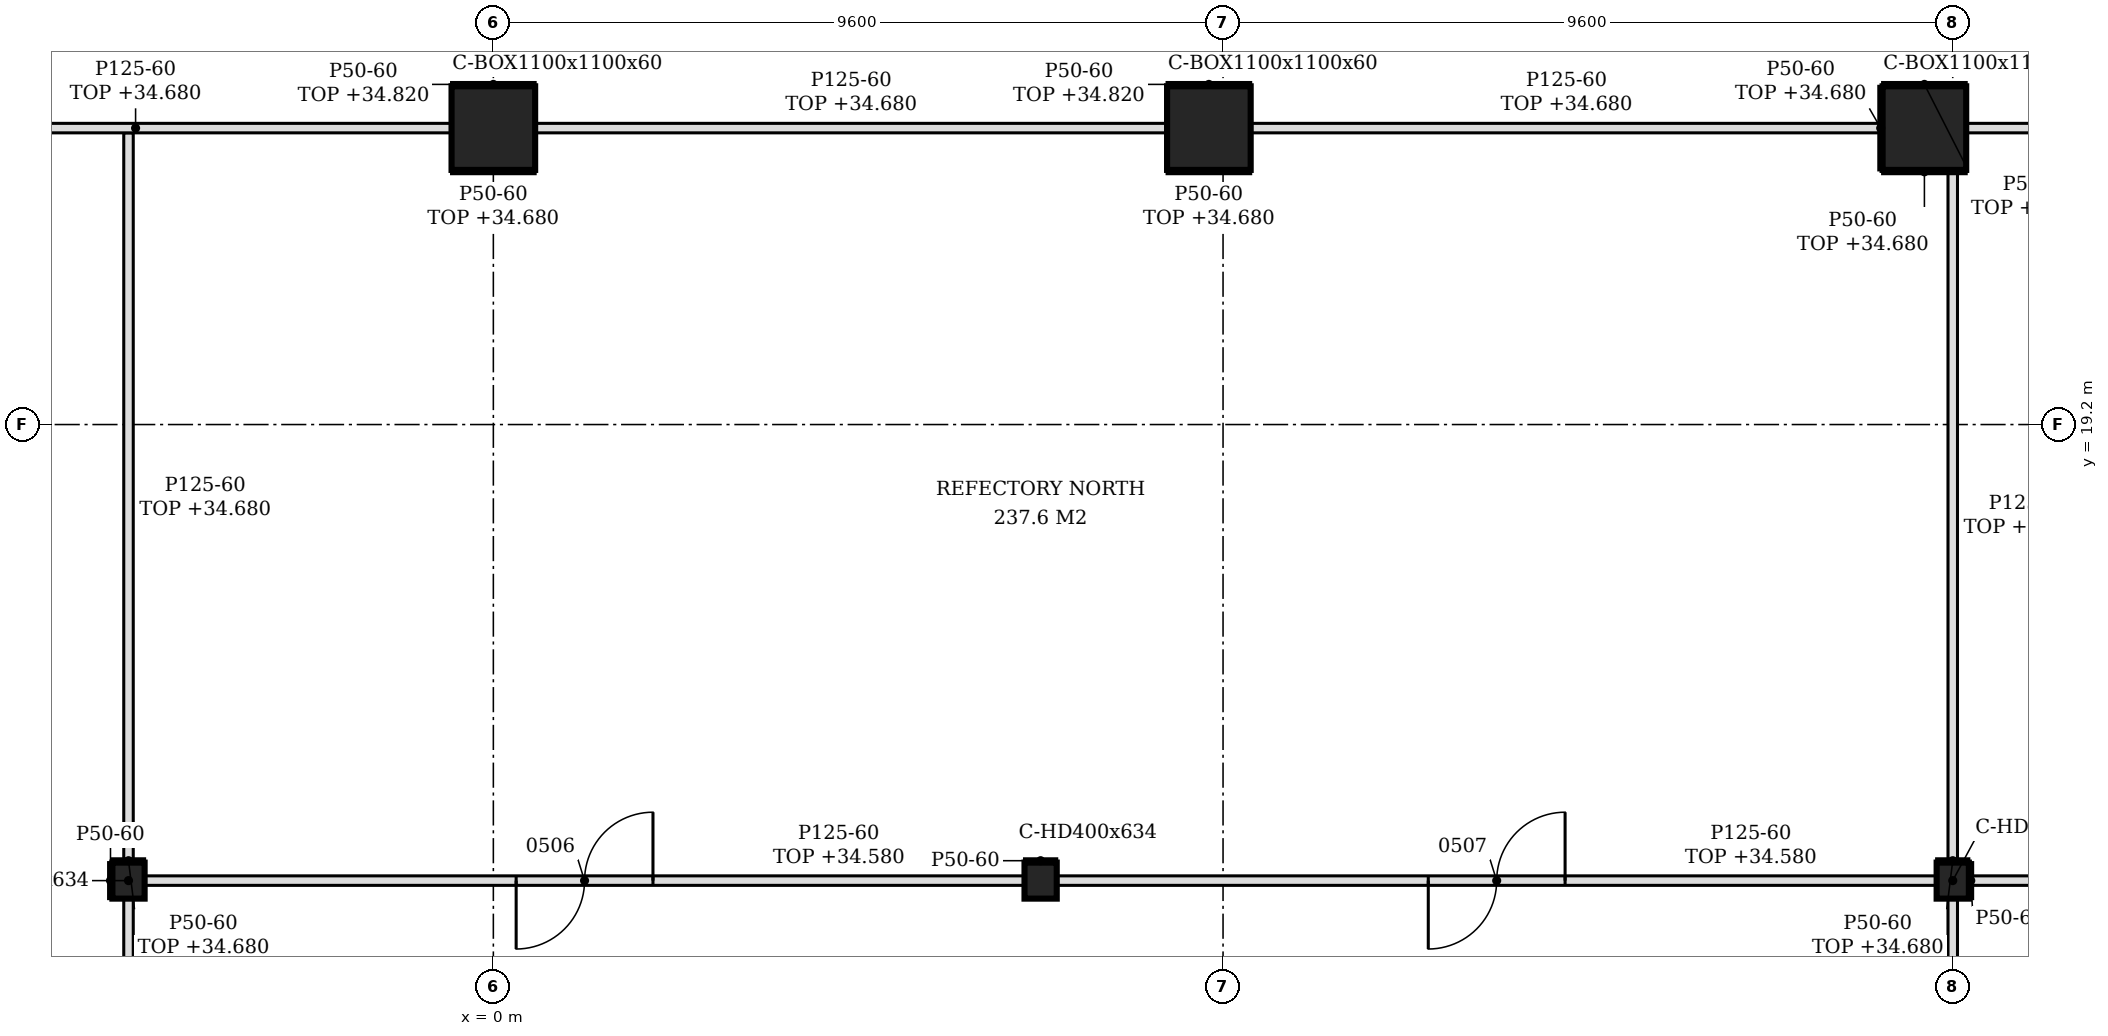
"""IFC4 building model, lengths in metres.
Left out: names, types, materials, properties, quantities, classifications, styles, units other than length and angle.
Written with IfcOpenShell. Run it as: python <this file> out.ifc"""

import sys

from ifc_helpers import new_model, si_unit, direction, frame, frame_2d, origin, origin_2d, place, context, subcontext, project, spatial, polyline, rectangle, hollow_rectangle, i_section, outline, extrude, element, fill, save


model = new_model("IFC4")
c1 = context("Model", 3, precision=1e-05, world=origin(), true_north=direction((0.0, 1.0)))
c2 = subcontext(c1, "Body", "Model", "MODEL_VIEW")
j1 = project(units=[si_unit("LENGTHUNIT", "METRE"), si_unit("PLANEANGLEUNIT", "RADIAN")], contexts=[c1])
p1 = place(None, origin())
s1 = spatial("IfcSite", under=j1, at=p1, CompositionType="ELEMENT")
p2 = place(p1, origin())
s2 = spatial("IfcBuilding", under=s1, at=p2, CompositionType="ELEMENT")
p3 = place(p2, frame((0.0, 0.0, 30.6)))
s3 = spatial("IfcBuildingStorey", under=s2, at=p3, CompositionType="ELEMENT", Elevation=30.6)
for number, where, z_axis, x_axis in (
    (1, (18.827, 23.1, -0.2), (0.0, 0.0, 1.0), (1.0, 0.0, 0.0)),
    (2, (9.414, 23.1, -0.2), (0.0, 0.0, 1.0), (1.0, 0.0, 0.0)),
    (3, (0.0, 23.1, -0.2), (0.0, 0.0, 1.0), (1.0, 0.0, 0.0)),
):
    element("IfcColumn", number, at=place(p3, frame(where, z_axis=z_axis, x_axis=x_axis)), inside=s3, PredefinedType="COLUMN", context=c2, shape_type="SweptSolid", body=[
        extrude(hollow_rectangle(XDim=1.1, YDim=1.1, WallThickness=0.06, at=origin_2d()), origin(), (0.0, 0.0, 1.0), 4.8),
    ])
for number, where, z_axis, x_axis in (
    (4, (-4.8, 13.2, -0.2), (0.0, 0.0, 1.0), (1.0, 0.0, 0.0)),
    (5, (7.2, 13.2, -0.2), (0.0, 0.0, 1.0), (1.0, 0.0, 0.0)),
    (6, (19.2, 13.2, -0.2), (0.0, 0.0, 1.0), (1.0, 0.0, 0.0)),
):
    element("IfcColumn", number, at=place(p3, frame(where, z_axis=z_axis, x_axis=x_axis)), inside=s3, PredefinedType="COLUMN", context=c2, shape_type="SweptSolid", body=[
        extrude(i_section(OverallWidth=0.424, OverallDepth=0.474, WebThickness=0.048, FlangeThickness=0.077, FilletRadius=0.015, at=origin_2d()), origin(), (0.0, 0.0, 1.0), 4.8),
    ])
for number, where, z_axis, x_axis in (
    (7, (-4.8, 7.863, 0.0), (0.0, 0.0, 1.0), (0.0, 1.0, 0.0)),
    (8, (19.2, 7.863, 0.0), (0.0, 0.0, 1.0), (0.0, 1.0, 0.0)),
):
    element("IfcWall", number, at=place(p3, frame(where, z_axis=z_axis, x_axis=x_axis)), inside=s3, PredefinedType="PARTITIONING", context=c2, shape_type="SweptSolid", body=[
        extrude(rectangle(XDim=5.1, YDim=0.125, at=frame_2d((2.55, 0.0))), origin(), (0.0, 0.0, 1.0), 3.98),
    ])
p4 = place(p3, frame((-4.588, 13.2, 0.0), z_axis=(0.0, 0.0, 1.0), x_axis=(1.0, 0.0, 0.0)))
e9 = element("IfcWall", 9, at=p4, inside=s3, PredefinedType="PARTITIONING", context=c2, shape_type="SweptSolid", body=[
    extrude(rectangle(XDim=11.576, YDim=0.125, at=frame_2d((5.788, 0.0))), origin(), (0.0, 0.0, 1.0), 3.98),
])
p5 = place(p4, frame((4.888, 0.0, 0.0)))
e10 = element("IfcOpeningElement", 10, at=p5, cuts=e9, PredefinedType="OPENING", context=c2, shape_type="SweptSolid", body=[
    extrude(rectangle(XDim=1.8, YDim=2.1, at=frame_2d((0.9, 1.05))), frame((0.0, 0.073, 0.0), z_axis=(0.0, -1.0, 0.0), x_axis=(1.0, 0.0, 0.0)), (0.0, 0.0, 1.0), 0.145),
])
p6 = place(p3, frame((7.412, 13.2, 0.0), z_axis=(0.0, 0.0, 1.0), x_axis=(1.0, 0.0, 0.0)))
e11 = element("IfcWall", 11, at=p6, inside=s3, PredefinedType="PARTITIONING", context=c2, shape_type="SweptSolid", body=[
    extrude(rectangle(XDim=11.576, YDim=0.125, at=frame_2d((5.788, 0.0))), origin(), (0.0, 0.0, 1.0), 3.98),
])
p7 = place(p6, frame((4.888, 0.0, 0.0)))
e12 = element("IfcOpeningElement", 12, at=p7, cuts=e11, PredefinedType="OPENING", context=c2, shape_type="SweptSolid", body=[
    extrude(rectangle(XDim=1.8, YDim=2.1, at=frame_2d((0.9, 1.05))), frame((0.0, 0.073, 0.0), z_axis=(0.0, -1.0, 0.0), x_axis=(1.0, 0.0, 0.0)), (0.0, 0.0, 1.0), 0.145),
])
p8 = place(p3, frame((19.412, 13.2, 0.0), z_axis=(0.0, 0.0, 1.0), x_axis=(1.0, 0.0, 0.0)))
e13 = element("IfcWall", 13, at=p8, inside=s3, PredefinedType="PARTITIONING", context=c2, shape_type="SweptSolid", body=[
    extrude(outline(polyline([(0.0, 0.0), (8.425, 0.0), (8.426, 4.08), (8.338, 4.08), (8.336, 4.6), (4.678, 4.6), (4.676, 4.18), (4.498, 4.18), (4.496, 4.6), (0.0, 4.6), (0.0, 0.0)])), frame((0.0, 0.062, 0.0), z_axis=(0.0, -1.0, 0.0), x_axis=(1.0, 0.0, 0.0)), (0.0, 0.0, 1.0), 0.125),
])
p9 = place(p3, frame((-4.8, 13.437, 0.0), z_axis=(0.0, 0.0, 1.0), x_axis=(0.0, 1.0, 0.0)))
e14 = element("IfcWall", 14, at=p9, inside=s3, PredefinedType="PARTITIONING", context=c2, shape_type="SweptSolid", body=[
    extrude(rectangle(XDim=9.601, YDim=0.125, at=frame_2d((4.8, 0.0))), origin(), (0.0, 0.0, 1.0), 4.08),
])
p10 = place(p3, frame((19.2, 13.437, 0.0), z_axis=(0.0, 0.0, 1.0), x_axis=(0.0, 1.0, 0.0)))
e15 = element("IfcWall", 15, at=p10, inside=s3, PredefinedType="PARTITIONING", context=c2, shape_type="SweptSolid", body=[
    extrude(rectangle(XDim=9.113, YDim=0.125, at=frame_2d((4.557, 0.0))), origin(), (0.0, 0.0, 1.0), 4.08),
])
for number, where, z_axis, x_axis in (
    (16, (-8.864, 23.1, 0.0), (0.0, 0.0, 1.0), (1.0, 0.0, 0.0)),
    (17, (0.55, 23.1, 0.0), (0.0, 0.0, 1.0), (1.0, 0.0, 0.0)),
    (18, (9.964, 23.1, 0.0), (0.0, 0.0, 1.0), (1.0, 0.0, 0.0)),
):
    element("IfcWall", number, at=place(p3, frame(where, z_axis=z_axis, x_axis=x_axis)), inside=s3, PredefinedType="PARTITIONING", context=c2, shape_type="SweptSolid", body=[
        extrude(rectangle(XDim=8.313, YDim=0.125, at=frame_2d((4.157, 0.0))), origin(), (0.0, 0.0, 1.0), 4.08),
    ])
p11 = place(p3, frame((19.377, 23.1, 0.0), z_axis=(0.0, 0.0, 1.0), x_axis=(1.0, 0.0, 0.0)))
e19 = element("IfcWall", 19, at=p11, inside=s3, PredefinedType="PARTITIONING", context=c2, shape_type="SweptSolid", body=[
    extrude(rectangle(XDim=8.585, YDim=0.125, at=frame_2d((4.292, 0.0))), origin(), (0.0, 0.0, 1.0), 4.6),
])
for number, where, z_axis, x_axis in (
    (20, (-5.037, 12.963, 0.0), (0.0, 0.0, 1.0), (0.0, 1.0, 0.0)),
    (21, (19.437, 12.963, 0.0), (0.0, 0.0, 1.0), (0.0, 1.0, 0.0)),
):
    element("IfcWall", number, at=place(p3, frame(where, z_axis=z_axis, x_axis=x_axis)), inside=s3, PredefinedType="PARTITIONING", context=c2, shape_type="SweptSolid", body=[
        extrude(rectangle(XDim=0.474, YDim=0.05, at=frame_2d((0.237, 0.0))), origin(), (0.0, 0.0, 1.0), 4.6),
    ])
p12 = place(p3, frame((-5.012, 13.462, 0.0), z_axis=(0.0, 0.0, 1.0), x_axis=(1.0, 0.0, 0.0)))
e22 = element("IfcWall", 22, at=p12, inside=s3, PredefinedType="PARTITIONING", context=c2, shape_type="SweptSolid", body=[
    extrude(rectangle(XDim=0.424, YDim=0.05, at=frame_2d((0.212, 0.0))), origin(), (0.0, 0.0, 1.0), 4.08),
])
p13 = place(p3, frame((6.988, 13.462, 0.0), z_axis=(0.0, 0.0, 1.0), x_axis=(1.0, 0.0, 0.0)))
e23 = element("IfcWall", 23, at=p13, inside=s3, PredefinedType="PARTITIONING", context=c2, shape_type="SweptSolid", body=[
    extrude(rectangle(XDim=0.424, YDim=0.05, at=frame_2d((0.212, 0.0))), origin(), (0.0, 0.0, 1.0), 4.6),
])
p14 = place(p3, frame((18.988, 13.462, 0.0), z_axis=(0.0, 0.0, 1.0), x_axis=(1.0, 0.0, 0.0)))
e24 = element("IfcWall", 24, at=p14, inside=s3, PredefinedType="PARTITIONING", context=c2, shape_type="SweptSolid", body=[
    extrude(rectangle(XDim=0.424, YDim=0.05, at=frame_2d((0.212, 0.0))), origin(), (0.0, 0.0, 1.0), 4.08),
])
p15 = place(p3, frame((18.252, 22.55, 0.0), z_axis=(0.0, 0.0, 1.0), x_axis=(0.0, 1.0, 0.0)))
e25 = element("IfcWall", 25, at=p15, inside=s3, PredefinedType="PARTITIONING", context=c2, shape_type="SweptSolid", body=[
    extrude(rectangle(XDim=1.1, YDim=0.05, at=frame_2d((0.55, 0.0))), origin(), (0.0, 0.0, 1.0), 4.08),
])
p16 = place(p3, frame((-0.55, 22.525, 0.0), z_axis=(0.0, 0.0, 1.0), x_axis=(1.0, 0.0, 0.0)))
e26 = element("IfcWall", 26, at=p16, inside=s3, PredefinedType="PARTITIONING", context=c2, shape_type="SweptSolid", body=[
    extrude(rectangle(XDim=1.1, YDim=0.05, at=frame_2d((0.55, 0.0))), origin(), (0.0, 0.0, 1.0), 4.08),
])
p17 = place(p3, frame((-0.55, 23.675, 0.0), z_axis=(0.0, 0.0, 1.0), x_axis=(1.0, 0.0, 0.0)))
e27 = element("IfcWall", 27, at=p17, inside=s3, PredefinedType="PARTITIONING", context=c2, shape_type="SweptSolid", body=[
    extrude(rectangle(XDim=1.1, YDim=0.05, at=frame_2d((0.55, 0.0))), origin(), (0.0, 0.0, 1.0), 4.22),
])
p18 = place(p3, frame((8.864, 22.525, 0.0), z_axis=(0.0, 0.0, 1.0), x_axis=(1.0, 0.0, 0.0)))
e28 = element("IfcWall", 28, at=p18, inside=s3, PredefinedType="PARTITIONING", context=c2, shape_type="SweptSolid", body=[
    extrude(rectangle(XDim=1.1, YDim=0.05, at=frame_2d((0.55, 0.0))), origin(), (0.0, 0.0, 1.0), 4.08),
])
p19 = place(p3, frame((8.864, 23.675, 0.0), z_axis=(0.0, 0.0, 1.0), x_axis=(1.0, 0.0, 0.0)))
e29 = element("IfcWall", 29, at=p19, inside=s3, PredefinedType="PARTITIONING", context=c2, shape_type="SweptSolid", body=[
    extrude(rectangle(XDim=1.1, YDim=0.05, at=frame_2d((0.55, 0.0))), origin(), (0.0, 0.0, 1.0), 4.22),
])
p20 = place(p3, frame((18.277, 22.525, 0.0), z_axis=(0.0, 0.0, 1.0), x_axis=(1.0, 0.0, 0.0)))
e30 = element("IfcWall", 30, at=p20, inside=s3, PredefinedType="PARTITIONING", context=c2, shape_type="SweptSolid", body=[
    extrude(rectangle(XDim=1.1, YDim=0.05, at=frame_2d((0.55, 0.0))), origin(), (0.0, 0.0, 1.0), 4.08),
])
p21 = place(p3, frame((18.277, 23.675, 0.0), z_axis=(0.0, 0.0, 1.0), x_axis=(1.0, 0.0, 0.0)))
e31 = element("IfcWall", 31, at=p21, inside=s3, PredefinedType="PARTITIONING", context=c2, shape_type="SweptSolid", body=[
    extrude(rectangle(XDim=1.1, YDim=0.05, at=frame_2d((0.55, 0.0))), origin(), (0.0, 0.0, 1.0), 4.22),
])
p22 = place(p5, frame((1.8, 0.0, 0.0), z_axis=(0.0, 0.0, 1.0), x_axis=(-1.0, 0.0, 0.0)))
e32 = element("IfcDoor", 32, at=p22, inside=s3, OperationType="DOUBLE_DOOR_SINGLE_SWING", PredefinedType="DOOR", context=c2, shape_type="SweptSolid", body=[
    extrude(rectangle(XDim=1.8, YDim=2.1, at=frame_2d((0.9, 1.05))), frame((0.0, 0.025, 0.0), z_axis=(0.0, -1.0, 0.0), x_axis=(1.0, 0.0, 0.0)), (0.0, 0.0, 1.0), 0.05),
])
fill(e10, e32)
p23 = place(p7, frame((1.8, 0.0, 0.0), z_axis=(0.0, 0.0, 1.0), x_axis=(-1.0, 0.0, 0.0)))
e33 = element("IfcDoor", 33, at=p23, inside=s3, OperationType="DOUBLE_DOOR_SINGLE_SWING", PredefinedType="DOOR", context=c2, shape_type="SweptSolid", body=[
    extrude(rectangle(XDim=1.8, YDim=2.1, at=frame_2d((0.9, 1.05))), frame((0.0, 0.025, 0.0), z_axis=(0.0, -1.0, 0.0), x_axis=(1.0, 0.0, 0.0)), (0.0, 0.0, 1.0), 0.05),
])
fill(e12, e33)
save(model, sys.argv[1])
